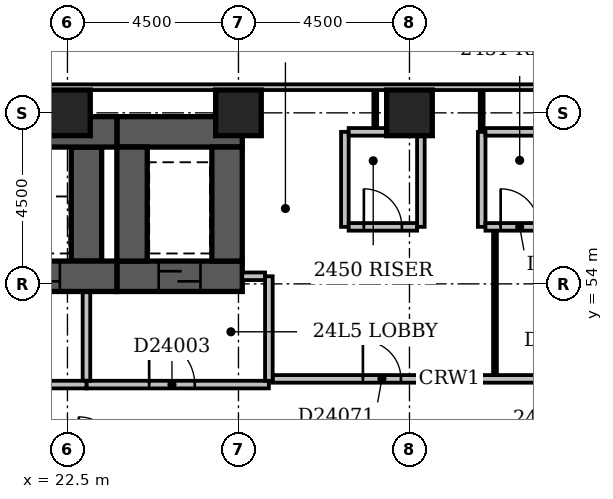
"""IFC4 building model, lengths in metres.
Left out: names, types, materials, properties, quantities, classifications, styles, units other than length and angle.
Written with IfcOpenShell. Run it as: python <this file> out.ifc"""

import sys

from ifc_helpers import new_model, si_unit, direction, frame, frame_2d, origin, origin_2d, place, context, subcontext, project, spatial, rectangle, extrude, element, fill, save


model = new_model("IFC4")
c1 = context("Model", 3, precision=1e-05, world=origin(), true_north=direction((0.0, 1.0)))
c2 = subcontext(c1, "Body", "Model", "MODEL_VIEW")
j1 = project(units=[si_unit("LENGTHUNIT", "METRE"), si_unit("PLANEANGLEUNIT", "RADIAN")], contexts=[c1])
p1 = place(None, origin())
s1 = spatial("IfcSite", under=j1, at=p1, CompositionType="ELEMENT")
p2 = place(p1, origin())
s2 = spatial("IfcBuilding", under=s1, at=p2, CompositionType="ELEMENT")
p3 = place(p2, frame((0.0, 0.0, 97.4)))
s3 = spatial("IfcBuildingStorey", under=s2, at=p3, CompositionType="ELEMENT", Elevation=97.4)
p4 = place(p3, frame((7.35, 54.2, -0.3), z_axis=(0.0, 0.0, 1.0), x_axis=(1.0, 0.0, 0.0)))
e1 = element("IfcWall", 1, at=p4, inside=s3, PredefinedType="SHEAR", context=c2, shape_type="SweptSolid", body=[
    extrude(rectangle(XDim=16.45, YDim=0.8, at=frame_2d((8.225, 0.0))), origin(), (0.0, 0.0, 1.0), 3.6),
])
p5 = place(p4, frame((1.35, 0.0, 0.3)))
e2 = element("IfcOpeningElement", 2, at=p5, cuts=e1, PredefinedType="OPENING", context=c2, shape_type="SweptSolid", body=[
    extrude(rectangle(XDim=1.1, YDim=2.1, at=frame_2d((0.55, 1.05))), frame((0.0, 0.412, 0.0), z_axis=(0.0, -1.0, 0.0), x_axis=(1.0, 0.0, 0.0)), (0.0, 0.0, 1.0), 0.824),
])
p6 = place(p4, frame((3.85, 0.0, 0.3)))
e3 = element("IfcOpeningElement", 3, at=p6, cuts=e1, PredefinedType="OPENING", context=c2, shape_type="SweptSolid", body=[
    extrude(rectangle(XDim=1.1, YDim=2.1, at=frame_2d((0.55, 1.05))), frame((0.0, 0.412, 0.0), z_axis=(0.0, -1.0, 0.0), x_axis=(1.0, 0.0, 0.0)), (0.0, 0.0, 1.0), 0.824),
])
p7 = place(p4, frame((6.35, 0.0, 0.3)))
e4 = element("IfcOpeningElement", 4, at=p7, cuts=e1, PredefinedType="OPENING", context=c2, shape_type="SweptSolid", body=[
    extrude(rectangle(XDim=1.1, YDim=2.1, at=frame_2d((0.55, 1.05))), frame((0.0, 0.412, 0.0), z_axis=(0.0, -1.0, 0.0), x_axis=(1.0, 0.0, 0.0)), (0.0, 0.0, 1.0), 0.824),
])
p8 = place(p4, frame((8.85, 0.0, 0.3)))
e5 = element("IfcOpeningElement", 5, at=p8, cuts=e1, PredefinedType="OPENING", context=c2, shape_type="SweptSolid", body=[
    extrude(rectangle(XDim=1.1, YDim=2.1, at=frame_2d((0.55, 1.05))), frame((0.0, 0.412, 0.0), z_axis=(0.0, -1.0, 0.0), x_axis=(1.0, 0.0, 0.0)), (0.0, 0.0, 1.0), 0.824),
])
p9 = place(p4, frame((11.35, 0.0, 0.3)))
e6 = element("IfcOpeningElement", 6, at=p9, cuts=e1, PredefinedType="OPENING", context=c2, shape_type="SweptSolid", body=[
    extrude(rectangle(XDim=1.1, YDim=2.1, at=frame_2d((0.55, 1.05))), frame((0.0, 0.412, 0.0), z_axis=(0.0, -1.0, 0.0), x_axis=(1.0, 0.0, 0.0)), (0.0, 0.0, 1.0), 0.824),
])
p10 = place(p4, frame((13.85, 0.0, 0.3)))
e7 = element("IfcOpeningElement", 7, at=p10, cuts=e1, PredefinedType="OPENING", context=c2, shape_type="SweptSolid", body=[
    extrude(rectangle(XDim=1.1, YDim=2.1, at=frame_2d((0.55, 1.05))), frame((0.0, 0.412, 0.0), z_axis=(0.0, -1.0, 0.0), x_axis=(1.0, 0.0, 0.0)), (0.0, 0.0, 1.0), 0.824),
])
p11 = place(p3, frame((7.35, 58.0, -0.3), z_axis=(0.0, 0.0, 1.0), x_axis=(1.0, 0.0, 0.0)))
e8 = element("IfcWall", 8, at=p11, inside=s3, PredefinedType="SHEAR", context=c2, shape_type="SweptSolid", body=[
    extrude(rectangle(XDim=16.45, YDim=0.8, at=frame_2d((8.225, 0.0))), origin(), (0.0, 0.0, 1.0), 3.6),
])
p12 = place(p3, frame((23.0, 54.6, -0.3), z_axis=(0.0, 0.0, 1.0), x_axis=(0.0, 1.0, 0.0)))
e9 = element("IfcWall", 9, at=p12, inside=s3, PredefinedType="SHEAR", context=c2, shape_type="SweptSolid", body=[
    extrude(rectangle(XDim=3.0, YDim=0.8, at=frame_2d((1.5, 0.0))), origin(), (0.0, 0.0, 1.0), 3.6),
])
p13 = place(p3, frame((23.8, 54.2, -0.3), z_axis=(0.0, 0.0, 1.0), x_axis=(1.0, 0.0, 0.0)))
e10 = element("IfcWall", 10, at=p13, inside=s3, PredefinedType="SHEAR", context=c2, shape_type="SweptSolid", body=[
    extrude(rectangle(XDim=3.3, YDim=0.8, at=frame_2d((1.65, 0.0))), origin(), (0.0, 0.0, 1.0), 3.6),
])
p14 = place(p13, frame((1.1, 0.0, 0.3)))
e11 = element("IfcOpeningElement", 11, at=p14, cuts=e10, PredefinedType="OPENING", context=c2, shape_type="SweptSolid", body=[
    extrude(rectangle(XDim=1.1, YDim=2.1, at=frame_2d((0.55, 1.05))), frame((0.0, 0.412, 0.0), z_axis=(0.0, -1.0, 0.0), x_axis=(1.0, 0.0, 0.0)), (0.0, 0.0, 1.0), 0.824),
])
p15 = place(p3, frame((23.8, 58.0, -0.3), z_axis=(0.0, 0.0, 1.0), x_axis=(1.0, 0.0, 0.0)))
e12 = element("IfcWall", 12, at=p15, inside=s3, PredefinedType="SHEAR", context=c2, shape_type="SweptSolid", body=[
    extrude(rectangle(XDim=3.3, YDim=0.8, at=frame_2d((1.65, 0.0))), origin(), (0.0, 0.0, 1.0), 3.6),
])
for number, where, z_axis, x_axis in (
    (13, (24.2, 54.6, -0.3), (0.0, 0.0, 1.0), (0.0, 1.0, 0.0)),
    (14, (26.7, 54.6, -0.3), (0.0, 0.0, 1.0), (0.0, 1.0, 0.0)),
):
    element("IfcWall", number, at=place(p3, frame(where, z_axis=z_axis, x_axis=x_axis)), inside=s3, PredefinedType="SHEAR", context=c2, shape_type="SweptSolid", body=[
        extrude(rectangle(XDim=3.0, YDim=0.8, at=frame_2d((1.5, 0.0))), origin(), (0.0, 0.0, 1.0), 3.6),
    ])
for number, where, z_axis, x_axis in (
    (15, (22.5, 58.5, -0.3), (0.0, 0.0, 1.0), (1.0, 0.0, 0.0)),
    (16, (27.0, 58.5, -0.3), (0.0, 0.0, 1.0), (1.0, 0.0, 0.0)),
    (17, (31.5, 58.5, -0.3), (0.0, 0.0, 1.0), (1.0, 0.0, 0.0)),
):
    element("IfcColumn", number, at=place(p3, frame(where, z_axis=z_axis, x_axis=x_axis)), inside=s3, PredefinedType="COLUMN", context=c2, shape_type="SweptSolid", body=[
        extrude(rectangle(XDim=1.2, YDim=1.2, at=origin_2d()), origin(), (0.0, 0.0, 1.0), 3.6),
    ])
p16 = place(p3, frame((68.1, 59.175, 0.0), z_axis=(0.0, 0.0, 1.0), x_axis=(-1.0, 0.0, 0.0)))
e18 = element("IfcWall", 18, at=p16, inside=s3, PredefinedType="STANDARD", context=c2, shape_type="SweptSolid", body=[
    extrude(rectangle(XDim=68.85, YDim=0.15, at=frame_2d((34.425, 0.0))), origin(), (0.0, 0.0, 1.0), 2.7),
])
p17 = place(p16, frame((1.474, 0.0, 0.6)))
e19 = element("IfcOpeningElement", 19, at=p17, cuts=e18, PredefinedType="OPENING", context=c2, shape_type="SweptSolid", body=[
    extrude(rectangle(XDim=1.2, YDim=1.8, at=frame_2d((0.6, 0.9))), frame((0.0, 0.087, 0.0), z_axis=(0.0, -1.0, 0.0), x_axis=(1.0, 0.0, 0.0)), (0.0, 0.0, 1.0), 0.174),
])
p18 = place(p16, frame((6.15, 0.0, 0.6)))
e20 = element("IfcOpeningElement", 20, at=p18, cuts=e18, PredefinedType="OPENING", context=c2, shape_type="SweptSolid", body=[
    extrude(rectangle(XDim=2.4, YDim=1.8, at=frame_2d((1.2, 0.9))), frame((0.0, 0.087, 0.0), z_axis=(0.0, -1.0, 0.0), x_axis=(1.0, 0.0, 0.0)), (0.0, 0.0, 1.0), 0.174),
])
p19 = place(p3, frame((8.0, 51.35, 0.0), z_axis=(0.0, 0.0, 1.0), x_axis=(1.0, 0.0, 0.0)))
e21 = element("IfcWall", 21, at=p19, inside=s3, PredefinedType="PARTITIONING", context=c2, shape_type="SweptSolid", body=[
    extrude(rectangle(XDim=15.0, YDim=0.2, at=frame_2d((7.5, 0.0))), origin(), (0.0, 0.0, 1.0), 3.3),
])
p20 = place(p19, frame((3.4, 0.0, 0.0)))
e22 = element("IfcOpeningElement", 22, at=p20, cuts=e21, PredefinedType="OPENING", context=c2, shape_type="SweptSolid", body=[
    extrude(rectangle(XDim=1.2, YDim=2.1, at=frame_2d((0.6, 1.05))), frame((0.0, 0.112, 0.0), z_axis=(0.0, -1.0, 0.0), x_axis=(1.0, 0.0, 0.0)), (0.0, 0.0, 1.0), 0.224),
])
p21 = place(p19, frame((9.4, 0.0, 0.0)))
e23 = element("IfcOpeningElement", 23, at=p21, cuts=e21, PredefinedType="OPENING", context=c2, shape_type="SweptSolid", body=[
    extrude(rectangle(XDim=1.2, YDim=2.1, at=frame_2d((0.6, 1.05))), frame((0.0, 0.112, 0.0), z_axis=(0.0, -1.0, 0.0), x_axis=(1.0, 0.0, 0.0)), (0.0, 0.0, 1.0), 0.224),
])
p22 = place(p3, frame((23.0, 51.45, 0.0), z_axis=(0.0, 0.0, 1.0), x_axis=(0.0, 1.0, 0.0)))
e24 = element("IfcWall", 24, at=p22, inside=s3, PredefinedType="PARTITIONING", context=c2, shape_type="SweptSolid", body=[
    extrude(rectangle(XDim=2.33, YDim=0.2, at=frame_2d((1.165, 0.0))), origin(), (0.0, 0.0, 1.0), 3.3),
])
p23 = place(p3, frame((23.0, 51.35, 0.0), z_axis=(0.0, 0.0, 1.0), x_axis=(1.0, 0.0, 0.0)))
e25 = element("IfcWall", 25, at=p23, inside=s3, PredefinedType="PARTITIONING", context=c2, shape_type="SweptSolid", body=[
    extrude(rectangle(XDim=4.8, YDim=0.2, at=frame_2d((2.4, 0.0))), origin(), (0.0, 0.0, 1.0), 3.3),
])
p24 = place(p23, frame((1.65, 0.0, 0.0)))
e26 = element("IfcOpeningElement", 26, at=p24, cuts=e25, PredefinedType="OPENING", context=c2, shape_type="SweptSolid", body=[
    extrude(rectangle(XDim=1.2, YDim=2.1, at=frame_2d((0.6, 1.05))), frame((0.0, 0.112, 0.0), z_axis=(0.0, -1.0, 0.0), x_axis=(1.0, 0.0, 0.0)), (0.0, 0.0, 1.0), 0.224),
])
p25 = place(p3, frame((27.8, 51.45, 0.0), z_axis=(0.0, 0.0, 1.0), x_axis=(0.0, 1.0, 0.0)))
e27 = element("IfcWall", 27, at=p25, inside=s3, PredefinedType="PARTITIONING", context=c2, shape_type="SweptSolid", body=[
    extrude(rectangle(XDim=2.75, YDim=0.2, at=frame_2d((1.375, 0.0))), origin(), (0.0, 0.0, 1.0), 3.3),
])
p26 = place(p3, frame((27.1, 54.2, 0.0), z_axis=(0.0, 0.0, 1.0), x_axis=(1.0, 0.0, 0.0)))
e28 = element("IfcWall", 28, at=p26, inside=s3, PredefinedType="PARTITIONING", context=c2, shape_type="SweptSolid", body=[
    extrude(rectangle(XDim=0.6, YDim=0.2, at=frame_2d((0.3, 0.0))), origin(), (0.0, 0.0, 1.0), 3.3),
])
p27 = place(p3, frame((27.9, 51.5, 0.0), z_axis=(0.0, 0.0, 1.0), x_axis=(1.0, 0.0, 0.0)))
e29 = element("IfcWall", 29, at=p27, inside=s3, PredefinedType="PARTITIONING", context=c2, shape_type="SweptSolid", body=[
    extrude(rectangle(XDim=9.3, YDim=0.2, at=frame_2d((4.65, 0.0))), origin(), (0.0, 0.0, 1.0), 3.3),
])
p28 = place(p27, frame((2.375, 0.0, 0.0)))
e30 = element("IfcOpeningElement", 30, at=p28, cuts=e29, PredefinedType="OPENING", context=c2, shape_type="SweptSolid", body=[
    extrude(rectangle(XDim=1.0, YDim=2.1, at=frame_2d((0.5, 1.05))), frame((0.0, 0.112, 0.0), z_axis=(0.0, -1.0, 0.0), x_axis=(1.0, 0.0, 0.0)), (0.0, 0.0, 1.0), 0.224),
])
p29 = place(p27, frame((7.125, 0.0, 0.0)))
e31 = element("IfcOpeningElement", 31, at=p29, cuts=e29, PredefinedType="OPENING", context=c2, shape_type="SweptSolid", body=[
    extrude(rectangle(XDim=1.0, YDim=2.1, at=frame_2d((0.5, 1.05))), frame((0.0, 0.112, 0.0), z_axis=(0.0, -1.0, 0.0), x_axis=(1.0, 0.0, 0.0)), (0.0, 0.0, 1.0), 0.224),
])
p30 = place(p3, frame((33.75, 51.6, 0.0), z_axis=(0.0, 0.0, 1.0), x_axis=(0.0, 1.0, 0.0)))
e32 = element("IfcWall", 32, at=p30, inside=s3, PredefinedType="PARTITIONING", context=c2, shape_type="SweptSolid", body=[
    extrude(rectangle(XDim=3.8, YDim=0.1, at=frame_2d((1.9, 0.0))), origin(), (0.0, 0.0, 1.0), 3.3),
])
p31 = place(p3, frame((29.8, 55.5, 0.0), z_axis=(0.0, 0.0, 1.0), x_axis=(0.0, 1.0, 0.0)))
e33 = element("IfcWall", 33, at=p31, inside=s3, PredefinedType="PARTITIONING", context=c2, shape_type="SweptSolid", body=[
    extrude(rectangle(XDim=2.5, YDim=0.2, at=frame_2d((1.25, 0.0))), origin(), (0.0, 0.0, 1.0), 3.3),
])
p32 = place(p3, frame((29.9, 55.5, 0.0), z_axis=(0.0, 0.0, 1.0), x_axis=(1.0, 0.0, 0.0)))
e34 = element("IfcWall", 34, at=p32, inside=s3, PredefinedType="PARTITIONING", context=c2, shape_type="SweptSolid", body=[
    extrude(rectangle(XDim=1.8, YDim=0.2, at=frame_2d((0.9, 0.0))), origin(), (0.0, 0.0, 1.0), 3.3),
])
p33 = place(p32, frame((0.4, 0.0, 0.0)))
e35 = element("IfcOpeningElement", 35, at=p33, cuts=e34, PredefinedType="OPENING", context=c2, shape_type="SweptSolid", body=[
    extrude(rectangle(XDim=1.0, YDim=2.1, at=frame_2d((0.5, 1.05))), frame((0.0, 0.112, 0.0), z_axis=(0.0, -1.0, 0.0), x_axis=(1.0, 0.0, 0.0)), (0.0, 0.0, 1.0), 0.224),
])
for number, where, z_axis, x_axis in (
    (36, (31.8, 55.5, 0.0), (0.0, 0.0, 1.0), (0.0, 1.0, 0.0)),
    (37, (33.4, 55.5, 0.0), (0.0, 0.0, 1.0), (0.0, 1.0, 0.0)),
):
    element("IfcWall", number, at=place(p3, frame(where, z_axis=z_axis, x_axis=x_axis)), inside=s3, PredefinedType="PARTITIONING", context=c2, shape_type="SweptSolid", body=[
        extrude(rectangle(XDim=2.5, YDim=0.2, at=frame_2d((1.25, 0.0))), origin(), (0.0, 0.0, 1.0), 3.3),
    ])
p34 = place(p3, frame((33.5, 55.5, 0.0), z_axis=(0.0, 0.0, 1.0), x_axis=(1.0, 0.0, 0.0)))
e38 = element("IfcWall", 38, at=p34, inside=s3, PredefinedType="PARTITIONING", context=c2, shape_type="SweptSolid", body=[
    extrude(rectangle(XDim=1.8, YDim=0.2, at=frame_2d((0.9, 0.0))), origin(), (0.0, 0.0, 1.0), 3.3),
])
p35 = place(p34, frame((0.4, 0.0, 0.0)))
e39 = element("IfcOpeningElement", 39, at=p35, cuts=e38, PredefinedType="OPENING", context=c2, shape_type="SweptSolid", body=[
    extrude(rectangle(XDim=1.0, YDim=2.1, at=frame_2d((0.5, 1.05))), frame((0.0, 0.112, 0.0), z_axis=(0.0, -1.0, 0.0), x_axis=(1.0, 0.0, 0.0)), (0.0, 0.0, 1.0), 0.224),
])
p36 = place(p3, frame((29.9, 58.0, 0.0), z_axis=(0.0, 0.0, 1.0), x_axis=(1.0, 0.0, 0.0)))
e40 = element("IfcWall", 40, at=p36, inside=s3, PredefinedType="PARTITIONING", context=c2, shape_type="SweptSolid", body=[
    extrude(rectangle(XDim=1.8, YDim=0.2, at=frame_2d((0.9, 0.0))), origin(), (0.0, 0.0, 1.0), 3.3),
])
p37 = place(p3, frame((33.4, 58.0, 0.0), z_axis=(0.0, 0.0, 1.0), x_axis=(0.0, 1.0, 0.0)))
e41 = element("IfcWall", 41, at=p37, inside=s3, PredefinedType="PARTITIONING", context=c2, shape_type="SweptSolid", body=[
    extrude(rectangle(XDim=1.1, YDim=0.1, at=frame_2d((0.55, 0.0))), origin(), (0.0, 0.0, 1.0), 3.3),
])
p38 = place(p3, frame((33.5, 58.0, 0.0), z_axis=(0.0, 0.0, 1.0), x_axis=(1.0, 0.0, 0.0)))
e42 = element("IfcWall", 42, at=p38, inside=s3, PredefinedType="PARTITIONING", context=c2, shape_type="SweptSolid", body=[
    extrude(rectangle(XDim=1.8, YDim=0.2, at=frame_2d((0.9, 0.0))), origin(), (0.0, 0.0, 1.0), 3.3),
])
p39 = place(p3, frame((30.6, 58.1, 0.0), z_axis=(0.0, 0.0, 1.0), x_axis=(0.0, 1.0, 0.0)))
e43 = element("IfcWall", 43, at=p39, inside=s3, PredefinedType="PARTITIONING", context=c2, shape_type="SweptSolid", body=[
    extrude(rectangle(XDim=1.0, YDim=0.1, at=frame_2d((0.5, 0.0))), origin(), (0.0, 0.0, 1.0), 3.3),
])
p40 = place(p24, origin())
e44 = element("IfcDoor", 44, at=p40, inside=s3, OperationType="SINGLE_SWING_LEFT", PredefinedType="DOOR", context=c2, shape_type="SweptSolid", body=[
    extrude(rectangle(XDim=1.2, YDim=2.1, at=frame_2d((0.6, 1.05))), frame((0.0, 0.025, 0.0), z_axis=(0.0, -1.0, 0.0), x_axis=(1.0, 0.0, 0.0)), (0.0, 0.0, 1.0), 0.05),
])
fill(e26, e44)
p41 = place(p14, origin())
e45 = element("IfcDoor", 45, at=p41, inside=s3, OperationType="SLIDING_TO_LEFT", PredefinedType="DOOR", context=c2, shape_type="SweptSolid", body=[
    extrude(rectangle(XDim=1.1, YDim=2.1, at=frame_2d((0.55, 1.05))), frame((0.0, 0.025, 0.0), z_axis=(0.0, -1.0, 0.0), x_axis=(1.0, 0.0, 0.0)), (0.0, 0.0, 1.0), 0.05),
])
fill(e11, e45)
p42 = place(p10, origin())
e46 = element("IfcDoor", 46, at=p42, inside=s3, OperationType="SLIDING_TO_LEFT", PredefinedType="DOOR", context=c2, shape_type="SweptSolid", body=[
    extrude(rectangle(XDim=1.1, YDim=2.1, at=frame_2d((0.55, 1.05))), frame((0.0, 0.025, 0.0), z_axis=(0.0, -1.0, 0.0), x_axis=(1.0, 0.0, 0.0)), (0.0, 0.0, 1.0), 0.05),
])
fill(e7, e46)
p43 = place(p28, origin())
e47 = element("IfcDoor", 47, at=p43, inside=s3, OperationType="SINGLE_SWING_LEFT", PredefinedType="DOOR", context=c2, shape_type="SweptSolid", body=[
    extrude(rectangle(XDim=1.0, YDim=2.1, at=frame_2d((0.5, 1.05))), frame((0.0, 0.025, 0.0), z_axis=(0.0, -1.0, 0.0), x_axis=(1.0, 0.0, 0.0)), (0.0, 0.0, 1.0), 0.05),
])
fill(e30, e47)
p44 = place(p33, origin())
e48 = element("IfcDoor", 48, at=p44, inside=s3, OperationType="SINGLE_SWING_LEFT", PredefinedType="DOOR", context=c2, shape_type="SweptSolid", body=[
    extrude(rectangle(XDim=1.0, YDim=2.1, at=frame_2d((0.5, 1.05))), frame((0.0, 0.025, 0.0), z_axis=(0.0, -1.0, 0.0), x_axis=(1.0, 0.0, 0.0)), (0.0, 0.0, 1.0), 0.05),
])
fill(e35, e48)
p45 = place(p35, origin())
e49 = element("IfcDoor", 49, at=p45, inside=s3, OperationType="SINGLE_SWING_LEFT", PredefinedType="DOOR", context=c2, shape_type="SweptSolid", body=[
    extrude(rectangle(XDim=1.0, YDim=2.1, at=frame_2d((0.5, 1.05))), frame((0.0, 0.025, 0.0), z_axis=(0.0, -1.0, 0.0), x_axis=(1.0, 0.0, 0.0)), (0.0, 0.0, 1.0), 0.05),
])
fill(e39, e49)
save(model, sys.argv[1])
